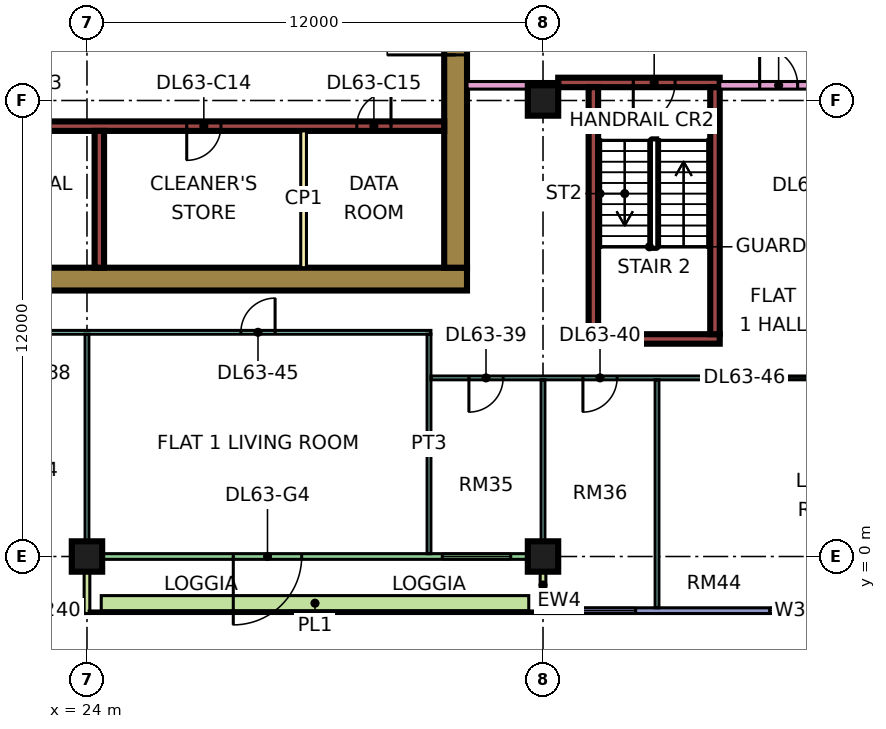
"""IFC4 building model, lengths in metres.
Left out: names, types, materials, properties, quantities, classifications, styles, units other than length and angle.
Written with IfcOpenShell. Run it as: python <this file> out.ifc"""

import sys

from ifc_helpers import new_model, si_unit, direction, frame, frame_2d, origin, origin_2d, place, context, subcontext, project, spatial, rectangle, extrude, element, fill, save


model = new_model("IFC4")
c1 = context("Model", 3, precision=1e-05, world=origin(), true_north=direction((0.0, 1.0)))
c2 = subcontext(c1, "Body", "Model", "MODEL_VIEW")
j1 = project(units=[si_unit("LENGTHUNIT", "METRE"), si_unit("PLANEANGLEUNIT", "RADIAN")], contexts=[c1])
p1 = place(None, origin())
s1 = spatial("IfcSite", under=j1, at=p1, CompositionType="ELEMENT")
p2 = place(p1, origin())
s2 = spatial("IfcBuilding", under=s1, at=p2, CompositionType="ELEMENT")
p3 = place(p2, frame((0.0, 0.0, 273.4)))
s3 = spatial("IfcBuildingStorey", under=s2, at=p3, CompositionType="ELEMENT", Elevation=273.4)
for number, where, z_axis, x_axis in (
    (1, (24.0, 0.0, 0.0), (0.0, 0.0, 1.0), (1.0, 0.0, 0.0)),
    (2, (36.0, 0.0, 0.0), (0.0, 0.0, 1.0), (1.0, 0.0, 0.0)),
    (3, (36.0, 12.0, 0.0), (0.0, 0.0, 1.0), (1.0, 0.0, 0.0)),
):
    element("IfcColumn", number, at=place(p3, frame(where, z_axis=z_axis, x_axis=x_axis)), inside=s3, PredefinedType="COLUMN", context=c2, shape_type="SweptSolid", body=[
        extrude(rectangle(XDim=0.8, YDim=0.8, at=origin_2d()), origin(), (0.0, 0.0, 1.0), 3.75),
    ])
p4 = place(p3, frame((9.0, 7.3, 0.0), z_axis=(0.0, 0.0, 1.0), x_axis=(1.0, 0.0, 0.0)))
e4 = element("IfcWall", 4, at=p4, inside=s3, PredefinedType="SHEAR", context=c2, shape_type="SweptSolid", body=[
    extrude(rectangle(XDim=25.0, YDim=0.6, at=frame_2d((12.5, 0.0))), origin(), (0.0, 0.0, 1.0), 3.75),
])
p5 = place(p3, frame((33.7, 7.6, 0.0), z_axis=(0.0, 0.0, 1.0), x_axis=(0.0, 1.0, 0.0)))
e5 = element("IfcWall", 5, at=p5, inside=s3, PredefinedType="SHEAR", context=c2, shape_type="SweptSolid", body=[
    extrude(rectangle(XDim=11.8, YDim=0.6, at=frame_2d((5.9, 0.0))), origin(), (0.0, 0.0, 1.0), 3.75),
])
p6 = place(p5, frame((5.6, 0.0, 0.0)))
e6 = element("IfcOpeningElement", 6, at=p6, cuts=e5, PredefinedType="OPENING", context=c2, shape_type="SweptSolid", body=[
    extrude(rectangle(XDim=1.8, YDim=2.4, at=frame_2d((0.9, 1.2))), frame((0.0, 0.31, 0.0), z_axis=(0.0, -1.0, 0.0), x_axis=(1.0, 0.0, 0.0)), (0.0, 0.0, 1.0), 0.62),
])
p7 = place(p3, frame((13.45, 11.325, 0.0), z_axis=(0.0, 0.0, 1.0), x_axis=(1.0, 0.0, 0.0)))
e7 = element("IfcWall", 7, at=p7, inside=s3, PredefinedType="SHEAR", context=c2, shape_type="SweptSolid", body=[
    extrude(rectangle(XDim=19.95, YDim=0.25, at=frame_2d((9.975, 0.0))), origin(), (0.0, 0.0, 1.0), 3.75),
])
p8 = place(p7, frame((2.8, 0.0, 0.0)))
e8 = element("IfcOpeningElement", 8, at=p8, cuts=e7, PredefinedType="OPENING", context=c2, shape_type="SweptSolid", body=[
    extrude(rectangle(XDim=0.9, YDim=2.1, at=frame_2d((0.45, 1.05))), frame((0.0, 0.135, 0.0), z_axis=(0.0, -1.0, 0.0), x_axis=(1.0, 0.0, 0.0)), (0.0, 0.0, 1.0), 0.27),
])
p9 = place(p7, frame((8.175, 0.0, 0.0)))
e9 = element("IfcOpeningElement", 9, at=p9, cuts=e7, PredefinedType="OPENING", context=c2, shape_type="SweptSolid", body=[
    extrude(rectangle(XDim=0.9, YDim=2.1, at=frame_2d((0.45, 1.05))), frame((0.0, 0.135, 0.0), z_axis=(0.0, -1.0, 0.0), x_axis=(1.0, 0.0, 0.0)), (0.0, 0.0, 1.0), 0.27),
])
p10 = place(p7, frame((13.175, 0.0, 0.0)))
e10 = element("IfcOpeningElement", 10, at=p10, cuts=e7, PredefinedType="OPENING", context=c2, shape_type="SweptSolid", body=[
    extrude(rectangle(XDim=0.9, YDim=2.1, at=frame_2d((0.45, 1.05))), frame((0.0, 0.135, 0.0), z_axis=(0.0, -1.0, 0.0), x_axis=(1.0, 0.0, 0.0)), (0.0, 0.0, 1.0), 0.27),
])
p11 = place(p7, frame((17.65, 0.0, 0.0)))
e11 = element("IfcOpeningElement", 11, at=p11, cuts=e7, PredefinedType="OPENING", context=c2, shape_type="SweptSolid", body=[
    extrude(rectangle(XDim=0.9, YDim=2.1, at=frame_2d((0.45, 1.05))), frame((0.0, 0.135, 0.0), z_axis=(0.0, -1.0, 0.0), x_axis=(1.0, 0.0, 0.0)), (0.0, 0.0, 1.0), 0.27),
])
p12 = place(p3, frame((24.325, 7.6, 0.0), z_axis=(0.0, 0.0, 1.0), x_axis=(0.0, 1.0, 0.0)))
e12 = element("IfcWall", 12, at=p12, inside=s3, PredefinedType="SHEAR", context=c2, shape_type="SweptSolid", body=[
    extrude(rectangle(XDim=3.6, YDim=0.25, at=frame_2d((1.8, 0.0))), origin(), (0.0, 0.0, 1.0), 3.75),
])
p13 = place(p3, frame((37.2, 5.725, 0.0), z_axis=(0.0, 0.0, 1.0), x_axis=(1.0, 0.0, 0.0)))
e13 = element("IfcWall", 13, at=p13, inside=s3, PredefinedType="SHEAR", context=c2, shape_type="SweptSolid", body=[
    extrude(rectangle(XDim=3.45, YDim=0.25, at=frame_2d((1.725, 0.0))), origin(), (0.0, 0.0, 1.0), 3.75),
])
p14 = place(p3, frame((36.4, 12.475, 0.0), z_axis=(0.0, 0.0, 1.0), x_axis=(1.0, 0.0, 0.0)))
e14 = element("IfcWall", 14, at=p14, inside=s3, PredefinedType="SHEAR", context=c2, shape_type="SweptSolid", body=[
    extrude(rectangle(XDim=4.25, YDim=0.25, at=frame_2d((2.125, 0.0))), origin(), (0.0, 0.0, 1.0), 3.75),
])
p15 = place(p14, frame((1.975, 0.0, 0.0)))
e15 = element("IfcOpeningElement", 15, at=p15, cuts=e14, PredefinedType="OPENING", context=c2, shape_type="SweptSolid", body=[
    extrude(rectangle(XDim=1.1, YDim=2.2, at=frame_2d((0.55, 1.1))), frame((0.0, 0.135, 0.0), z_axis=(0.0, -1.0, 0.0), x_axis=(1.0, 0.0, 0.0)), (0.0, 0.0, 1.0), 0.27),
])
for number, where, z_axis, x_axis in (
    (16, (37.325, 5.85, 0.0), (0.0, 0.0, 1.0), (0.0, 1.0, 0.0)),
    (17, (40.525, 5.85, 0.0), (0.0, 0.0, 1.0), (0.0, 1.0, 0.0)),
):
    element("IfcWall", number, at=place(p3, frame(where, z_axis=z_axis, x_axis=x_axis)), inside=s3, PredefinedType="SHEAR", context=c2, shape_type="SweptSolid", body=[
        extrude(rectangle(XDim=6.5, YDim=0.25, at=frame_2d((3.25, 0.0))), origin(), (0.0, 0.0, 1.0), 3.75),
    ])
p16 = place(p3, frame((12.5, -1.425, 0.0), z_axis=(0.0, 0.0, 1.0), x_axis=(1.0, 0.0, 0.0)))
e18 = element("IfcWall", 18, at=p16, inside=s3, PredefinedType="SOLIDWALL", context=c2, shape_type="SweptSolid", body=[
    extrude(rectangle(XDim=11.425, YDim=0.15, at=frame_2d((5.712, 0.0))), origin(), (0.0, 0.0, 1.0), 3.35),
])
p17 = place(p16, frame((0.35, 0.0, 0.45)))
e19 = element("IfcOpeningElement", 19, at=p17, cuts=e18, PredefinedType="OPENING", context=c2, shape_type="SweptSolid", body=[
    extrude(rectangle(XDim=1.8, YDim=2.4, at=frame_2d((0.9, 1.2))), frame((0.0, 0.085, 0.0), z_axis=(0.0, -1.0, 0.0), x_axis=(1.0, 0.0, 0.0)), (0.0, 0.0, 1.0), 0.17),
])
p18 = place(p16, frame((3.1, 0.0, 0.45)))
e20 = element("IfcOpeningElement", 20, at=p18, cuts=e18, PredefinedType="OPENING", context=c2, shape_type="SweptSolid", body=[
    extrude(rectangle(XDim=1.8, YDim=2.4, at=frame_2d((0.9, 1.2))), frame((0.0, 0.085, 0.0), z_axis=(0.0, -1.0, 0.0), x_axis=(1.0, 0.0, 0.0)), (0.0, 0.0, 1.0), 0.17),
])
p19 = place(p16, frame((6.1, 0.0, 0.45)))
e21 = element("IfcOpeningElement", 21, at=p19, cuts=e18, PredefinedType="OPENING", context=c2, shape_type="SweptSolid", body=[
    extrude(rectangle(XDim=1.8, YDim=2.4, at=frame_2d((0.9, 1.2))), frame((0.0, 0.085, 0.0), z_axis=(0.0, -1.0, 0.0), x_axis=(1.0, 0.0, 0.0)), (0.0, 0.0, 1.0), 0.17),
])
p20 = place(p16, frame((9.062, 0.0, 0.45)))
e22 = element("IfcOpeningElement", 22, at=p20, cuts=e18, PredefinedType="OPENING", context=c2, shape_type="SweptSolid", body=[
    extrude(rectangle(XDim=1.8, YDim=2.4, at=frame_2d((0.9, 1.2))), frame((0.0, 0.085, 0.0), z_axis=(0.0, -1.0, 0.0), x_axis=(1.0, 0.0, 0.0)), (0.0, 0.0, 1.0), 0.17),
])
p21 = place(p3, frame((24.075, 0.0, 0.0), z_axis=(0.0, 0.0, 1.0), x_axis=(1.0, 0.0, 0.0)))
e23 = element("IfcWall", 23, at=p21, inside=s3, PredefinedType="SOLIDWALL", context=c2, shape_type="SweptSolid", body=[
    extrude(rectangle(XDim=11.85, YDim=0.15, at=frame_2d((5.925, 0.0))), origin(), (0.0, 0.0, 1.0), 3.35),
])
p22 = place(p21, frame((3.775, 0.0, 0.0)))
e24 = element("IfcOpeningElement", 24, at=p22, cuts=e23, PredefinedType="OPENING", context=c2, shape_type="SweptSolid", body=[
    extrude(rectangle(XDim=1.8, YDim=2.4, at=frame_2d((0.9, 1.2))), frame((0.0, 0.085, 0.0), z_axis=(0.0, -1.0, 0.0), x_axis=(1.0, 0.0, 0.0)), (0.0, 0.0, 1.0), 0.17),
])
p23 = place(p21, frame((9.275, 0.0, 0.45)))
e25 = element("IfcOpeningElement", 25, at=p23, cuts=e23, PredefinedType="OPENING", context=c2, shape_type="SweptSolid", body=[
    extrude(rectangle(XDim=1.8, YDim=2.4, at=frame_2d((0.9, 1.2))), frame((0.0, 0.085, 0.0), z_axis=(0.0, -1.0, 0.0), x_axis=(1.0, 0.0, 0.0)), (0.0, 0.0, 1.0), 0.17),
])
for number, where, z_axis, x_axis in (
    (26, (24.0, -1.5, 0.0), (0.0, 0.0, 1.0), (0.0, 1.0, 0.0)),
    (27, (36.0, -1.5, 0.0), (0.0, 0.0, 1.0), (0.0, 1.0, 0.0)),
):
    element("IfcWall", number, at=place(p3, frame(where, z_axis=z_axis, x_axis=x_axis)), inside=s3, PredefinedType="SOLIDWALL", context=c2, shape_type="SweptSolid", body=[
        extrude(rectangle(XDim=1.5, YDim=0.15, at=frame_2d((0.75, 0.0))), origin(), (0.0, 0.0, 1.0), 3.35),
    ])
p24 = place(p3, frame((36.075, -1.425, 0.0), z_axis=(0.0, 0.0, 1.0), x_axis=(1.0, 0.0, 0.0)))
e28 = element("IfcWall", 28, at=p24, inside=s3, PredefinedType="SOLIDWALL", context=c2, shape_type="SweptSolid", body=[
    extrude(rectangle(XDim=11.85, YDim=0.15, at=frame_2d((5.925, 0.0))), origin(), (0.0, 0.0, 1.0), 3.35),
])
p25 = place(p24, frame((0.562, 0.0, 0.45)))
e29 = element("IfcOpeningElement", 29, at=p25, cuts=e28, PredefinedType="OPENING", context=c2, shape_type="SweptSolid", body=[
    extrude(rectangle(XDim=1.8, YDim=2.4, at=frame_2d((0.9, 1.2))), frame((0.0, 0.085, 0.0), z_axis=(0.0, -1.0, 0.0), x_axis=(1.0, 0.0, 0.0)), (0.0, 0.0, 1.0), 0.17),
])
p26 = place(p24, frame((5.887, 0.0, 0.45)))
e30 = element("IfcOpeningElement", 30, at=p26, cuts=e28, PredefinedType="OPENING", context=c2, shape_type="SweptSolid", body=[
    extrude(rectangle(XDim=3.0, YDim=2.4, at=frame_2d((1.5, 1.2))), frame((0.0, 0.085, 0.0), z_axis=(0.0, -1.0, 0.0), x_axis=(1.0, 0.0, 0.0)), (0.0, 0.0, 1.0), 0.17),
])
p27 = place(p3, frame((24.375, -1.229, 0.0), z_axis=(0.0, 0.0, 1.0), x_axis=(1.0, 0.0, 0.0)))
e31 = element("IfcWall", 31, at=p27, inside=s3, PredefinedType="SOLIDWALL", context=c2, shape_type="SweptSolid", body=[
    extrude(rectangle(XDim=11.25, YDim=0.4, at=frame_2d((5.625, 0.0))), origin(), (0.0, 0.0, 1.0), 0.7),
])
p28 = place(p3, frame((29.7, 7.6, 0.0), z_axis=(0.0, 0.0, 1.0), x_axis=(0.0, 1.0, 0.0)))
e32 = element("IfcWall", 32, at=p28, inside=s3, PredefinedType="PARTITIONING", context=c2, shape_type="SweptSolid", body=[
    extrude(rectangle(XDim=3.6, YDim=0.15, at=frame_2d((1.8, 0.0))), origin(), (0.0, 0.0, 1.0), 3.35),
])
p29 = place(p3, frame((11.95, 5.9, 0.0), z_axis=(0.0, 0.0, 1.0), x_axis=(1.0, 0.0, 0.0)))
e33 = element("IfcWall", 33, at=p29, inside=s3, PredefinedType="PARTITIONING", context=c2, shape_type="SweptSolid", body=[
    extrude(rectangle(XDim=21.1, YDim=0.1, at=frame_2d((10.55, 0.0))), origin(), (0.0, 0.0, 1.0), 3.35),
])
p30 = place(p29, frame((1.1, 0.0, 0.0)))
e34 = element("IfcOpeningElement", 34, at=p30, cuts=e33, PredefinedType="OPENING", context=c2, shape_type="SweptSolid", body=[
    extrude(rectangle(XDim=0.9, YDim=2.1, at=frame_2d((0.45, 1.05))), frame((0.0, 0.06, 0.0), z_axis=(0.0, -1.0, 0.0), x_axis=(1.0, 0.0, 0.0)), (0.0, 0.0, 1.0), 0.12),
])
p31 = place(p29, frame((4.1, 0.0, 0.0)))
e35 = element("IfcOpeningElement", 35, at=p31, cuts=e33, PredefinedType="OPENING", context=c2, shape_type="SweptSolid", body=[
    extrude(rectangle(XDim=0.9, YDim=2.1, at=frame_2d((0.45, 1.05))), frame((0.0, 0.06, 0.0), z_axis=(0.0, -1.0, 0.0), x_axis=(1.0, 0.0, 0.0)), (0.0, 0.0, 1.0), 0.12),
])
p32 = place(p29, frame((7.1, 0.0, 0.0)))
e36 = element("IfcOpeningElement", 36, at=p32, cuts=e33, PredefinedType="OPENING", context=c2, shape_type="SweptSolid", body=[
    extrude(rectangle(XDim=0.9, YDim=2.1, at=frame_2d((0.45, 1.05))), frame((0.0, 0.06, 0.0), z_axis=(0.0, -1.0, 0.0), x_axis=(1.0, 0.0, 0.0)), (0.0, 0.0, 1.0), 0.12),
])
p33 = place(p29, frame((10.1, 0.0, 0.0)))
e37 = element("IfcOpeningElement", 37, at=p33, cuts=e33, PredefinedType="OPENING", context=c2, shape_type="SweptSolid", body=[
    extrude(rectangle(XDim=0.9, YDim=2.1, at=frame_2d((0.45, 1.05))), frame((0.0, 0.06, 0.0), z_axis=(0.0, -1.0, 0.0), x_axis=(1.0, 0.0, 0.0)), (0.0, 0.0, 1.0), 0.12),
])
p34 = place(p29, frame((16.1, 0.0, 0.0)))
e38 = element("IfcOpeningElement", 38, at=p34, cuts=e33, PredefinedType="OPENING", context=c2, shape_type="SweptSolid", body=[
    extrude(rectangle(XDim=0.9, YDim=2.1, at=frame_2d((0.45, 1.05))), frame((0.0, 0.06, 0.0), z_axis=(0.0, -1.0, 0.0), x_axis=(1.0, 0.0, 0.0)), (0.0, 0.0, 1.0), 0.12),
])
p35 = place(p3, frame((24.0, 0.0, 0.0), z_axis=(0.0, 0.0, 1.0), x_axis=(0.0, 1.0, 0.0)))
e39 = element("IfcWall", 39, at=p35, inside=s3, PredefinedType="PARTITIONING", context=c2, shape_type="SweptSolid", body=[
    extrude(rectangle(XDim=5.85, YDim=0.1, at=frame_2d((2.925, 0.0))), origin(), (0.0, 0.0, 1.0), 3.35),
])
p36 = place(p3, frame((33.0, 0.074, 0.0), z_axis=(0.0, 0.0, 1.0), x_axis=(0.0, 1.0, 0.0)))
e40 = element("IfcWall", 40, at=p36, inside=s3, PredefinedType="PARTITIONING", context=c2, shape_type="SweptSolid", body=[
    extrude(rectangle(XDim=5.776, YDim=0.1, at=frame_2d((2.888, 0.0))), origin(), (0.0, 0.0, 1.0), 3.35),
])
p37 = place(p3, frame((33.05, 4.7, 0.0), z_axis=(0.0, 0.0, 1.0), x_axis=(1.0, 0.0, 0.0)))
e41 = element("IfcWall", 41, at=p37, inside=s3, PredefinedType="PARTITIONING", context=c2, shape_type="SweptSolid", body=[
    extrude(rectangle(XDim=14.85, YDim=0.1, at=frame_2d((7.425, 0.0))), origin(), (0.0, 0.0, 1.0), 3.35),
])
p38 = place(p37, frame((1.0, 0.0, 0.0)))
e42 = element("IfcOpeningElement", 42, at=p38, cuts=e41, PredefinedType="OPENING", context=c2, shape_type="SweptSolid", body=[
    extrude(rectangle(XDim=0.9, YDim=2.1, at=frame_2d((0.45, 1.05))), frame((0.0, 0.06, 0.0), z_axis=(0.0, -1.0, 0.0), x_axis=(1.0, 0.0, 0.0)), (0.0, 0.0, 1.0), 0.12),
])
p39 = place(p37, frame((4.0, 0.0, 0.0)))
e43 = element("IfcOpeningElement", 43, at=p39, cuts=e41, PredefinedType="OPENING", context=c2, shape_type="SweptSolid", body=[
    extrude(rectangle(XDim=0.9, YDim=2.1, at=frame_2d((0.45, 1.05))), frame((0.0, 0.06, 0.0), z_axis=(0.0, -1.0, 0.0), x_axis=(1.0, 0.0, 0.0)), (0.0, 0.0, 1.0), 0.12),
])
p40 = place(p37, frame((10.0, 0.0, 0.0)))
e44 = element("IfcOpeningElement", 44, at=p40, cuts=e41, PredefinedType="OPENING", context=c2, shape_type="SweptSolid", body=[
    extrude(rectangle(XDim=0.9, YDim=2.1, at=frame_2d((0.45, 1.05))), frame((0.0, 0.06, 0.0), z_axis=(0.0, -1.0, 0.0), x_axis=(1.0, 0.0, 0.0)), (0.0, 0.0, 1.0), 0.12),
])
p41 = place(p3, frame((34.0, 12.4, 0.0), z_axis=(0.0, 0.0, 1.0), x_axis=(1.0, 0.0, 0.0)))
e45 = element("IfcWall", 45, at=p41, inside=s3, PredefinedType="PARTITIONING", context=c2, shape_type="SweptSolid", body=[
    extrude(rectangle(XDim=2.401, YDim=0.2, at=frame_2d((1.2, 0.0))), origin(), (0.0, 0.0, 1.0), 3.35),
])
p42 = place(p3, frame((36.0, 0.0, 0.0), z_axis=(0.0, 0.0, 1.0), x_axis=(0.0, 1.0, 0.0)))
e46 = element("IfcWall", 46, at=p42, inside=s3, PredefinedType="PARTITIONING", context=c2, shape_type="SweptSolid", body=[
    extrude(rectangle(XDim=4.65, YDim=0.1, at=frame_2d((2.325, 0.0))), origin(), (0.0, 0.0, 1.0), 3.35),
])
p43 = place(p3, frame((39.0, -1.35, 0.0), z_axis=(0.0, 0.0, 1.0), x_axis=(0.0, 1.0, 0.0)))
e47 = element("IfcWall", 47, at=p43, inside=s3, PredefinedType="PARTITIONING", context=c2, shape_type="SweptSolid", body=[
    extrude(rectangle(XDim=6.0, YDim=0.1, at=frame_2d((3.0, 0.0))), origin(), (0.0, 0.0, 1.0), 3.35),
])
p44 = place(p3, frame((40.65, 12.4, 0.0), z_axis=(0.0, 0.0, 1.0), x_axis=(1.0, 0.0, 0.0)))
e48 = element("IfcWall", 48, at=p44, inside=s3, PredefinedType="PARTITIONING", context=c2, shape_type="SweptSolid", body=[
    extrude(rectangle(XDim=22.35, YDim=0.2, at=frame_2d((11.175, 0.0))), origin(), (0.0, 0.0, 1.0), 3.35),
])
p45 = place(p44, frame((14.25, 0.0, 0.0)))
e49 = element("IfcOpeningElement", 49, at=p45, cuts=e48, PredefinedType="OPENING", context=c2, shape_type="SweptSolid", body=[
    extrude(rectangle(XDim=1.0, YDim=2.1, at=frame_2d((0.5, 1.05))), frame((0.0, 0.11, 0.0), z_axis=(0.0, -1.0, 0.0), x_axis=(1.0, 0.0, 0.0)), (0.0, 0.0, 1.0), 0.22),
])
p46 = place(p44, frame((1.05, 0.0, 0.0)))
e50 = element("IfcOpeningElement", 50, at=p46, cuts=e48, PredefinedType="OPENING", context=c2, shape_type="SweptSolid", body=[
    extrude(rectangle(XDim=1.0, YDim=2.1, at=frame_2d((0.5, 1.05))), frame((0.0, 0.11, 0.0), z_axis=(0.0, -1.0, 0.0), x_axis=(1.0, 0.0, 0.0)), (0.0, 0.0, 1.0), 0.22),
])
p47 = place(p20, origin())
e51 = element("IfcWindow", 51, at=p47, inside=s3, PartitioningType="SINGLE_PANEL", PredefinedType="WINDOW", context=c2, shape_type="SweptSolid", body=[
    extrude(rectangle(XDim=1.8, YDim=2.4, at=frame_2d((0.9, 1.2))), frame((0.0, 0.03, 0.0), z_axis=(0.0, -1.0, 0.0), x_axis=(1.0, 0.0, 0.0)), (0.0, 0.0, 1.0), 0.06),
])
fill(e22, e51)
p48 = place(p22, frame((1.8, 0.0, 0.0), z_axis=(0.0, 0.0, 1.0), x_axis=(-1.0, 0.0, 0.0)))
e52 = element("IfcDoor", 52, at=p48, inside=s3, OperationType="DOUBLE_DOOR_SINGLE_SWING", PredefinedType="DOOR", context=c2, shape_type="SweptSolid", body=[
    extrude(rectangle(XDim=1.8, YDim=2.4, at=frame_2d((0.9, 1.2))), frame((0.0, 0.025, 0.0), z_axis=(0.0, -1.0, 0.0), x_axis=(1.0, 0.0, 0.0)), (0.0, 0.0, 1.0), 0.05),
])
fill(e24, e52)
p49 = place(p23, origin())
e53 = element("IfcWindow", 53, at=p49, inside=s3, PartitioningType="SINGLE_PANEL", PredefinedType="WINDOW", context=c2, shape_type="SweptSolid", body=[
    extrude(rectangle(XDim=1.8, YDim=2.4, at=frame_2d((0.9, 1.2))), frame((0.0, 0.03, 0.0), z_axis=(0.0, -1.0, 0.0), x_axis=(1.0, 0.0, 0.0)), (0.0, 0.0, 1.0), 0.06),
])
fill(e25, e53)
p50 = place(p25, origin())
e54 = element("IfcWindow", 54, at=p50, inside=s3, PartitioningType="SINGLE_PANEL", PredefinedType="WINDOW", context=c2, shape_type="SweptSolid", body=[
    extrude(rectangle(XDim=1.8, YDim=2.4, at=frame_2d((0.9, 1.2))), frame((0.0, 0.03, 0.0), z_axis=(0.0, -1.0, 0.0), x_axis=(1.0, 0.0, 0.0)), (0.0, 0.0, 1.0), 0.06),
])
fill(e29, e54)
p51 = place(p26, origin())
e55 = element("IfcWindow", 55, at=p51, inside=s3, PartitioningType="SINGLE_PANEL", PredefinedType="WINDOW", context=c2, shape_type="SweptSolid", body=[
    extrude(rectangle(XDim=3.0, YDim=2.4, at=frame_2d((1.5, 1.2))), frame((0.0, 0.03, 0.0), z_axis=(0.0, -1.0, 0.0), x_axis=(1.0, 0.0, 0.0)), (0.0, 0.0, 1.0), 0.06),
])
fill(e30, e55)
p52 = place(p6, origin())
e56 = element("IfcDoor", 56, at=p52, inside=s3, OperationType="DOUBLE_DOOR_SINGLE_SWING", PredefinedType="DOOR", context=c2, shape_type="SweptSolid", body=[
    extrude(rectangle(XDim=1.8, YDim=2.4, at=frame_2d((0.9, 1.2))), frame((0.0, 0.025, 0.0), z_axis=(0.0, -1.0, 0.0), x_axis=(1.0, 0.0, 0.0)), (0.0, 0.0, 1.0), 0.05),
])
fill(e6, e56)
p53 = place(p15, frame((1.1, 0.0, 0.0), z_axis=(0.0, 0.0, 1.0), x_axis=(-1.0, 0.0, 0.0)))
e57 = element("IfcDoor", 57, at=p53, inside=s3, OperationType="SINGLE_SWING_LEFT", PredefinedType="DOOR", context=c2, shape_type="SweptSolid", body=[
    extrude(rectangle(XDim=1.1, YDim=2.2, at=frame_2d((0.55, 1.1))), frame((0.0, 0.025, 0.0), z_axis=(0.0, -1.0, 0.0), x_axis=(1.0, 0.0, 0.0)), (0.0, 0.0, 1.0), 0.05),
])
fill(e15, e57)
p54 = place(p10, frame((0.9, 0.0, 0.0), z_axis=(0.0, 0.0, 1.0), x_axis=(-1.0, 0.0, 0.0)))
e58 = element("IfcDoor", 58, at=p54, inside=s3, OperationType="SINGLE_SWING_LEFT", PredefinedType="DOOR", context=c2, shape_type="SweptSolid", body=[
    extrude(rectangle(XDim=0.9, YDim=2.1, at=frame_2d((0.45, 1.05))), frame((0.0, 0.025, 0.0), z_axis=(0.0, -1.0, 0.0), x_axis=(1.0, 0.0, 0.0)), (0.0, 0.0, 1.0), 0.05),
])
fill(e10, e58)
p55 = place(p11, frame((0.9, 0.0, 0.0), z_axis=(0.0, 0.0, 1.0), x_axis=(-1.0, 0.0, 0.0)))
e59 = element("IfcDoor", 59, at=p55, inside=s3, OperationType="SINGLE_SWING_RIGHT", PredefinedType="DOOR", context=c2, shape_type="SweptSolid", body=[
    extrude(rectangle(XDim=0.9, YDim=2.1, at=frame_2d((0.45, 1.05))), frame((0.0, 0.025, 0.0), z_axis=(0.0, -1.0, 0.0), x_axis=(1.0, 0.0, 0.0)), (0.0, 0.0, 1.0), 0.05),
])
fill(e11, e59)
p56 = place(p38, frame((0.9, 0.0, 0.0), z_axis=(0.0, 0.0, 1.0), x_axis=(-1.0, 0.0, 0.0)))
e60 = element("IfcDoor", 60, at=p56, inside=s3, OperationType="SINGLE_SWING_LEFT", PredefinedType="DOOR", context=c2, shape_type="SweptSolid", body=[
    extrude(rectangle(XDim=0.9, YDim=2.1, at=frame_2d((0.45, 1.05))), frame((0.0, 0.025, 0.0), z_axis=(0.0, -1.0, 0.0), x_axis=(1.0, 0.0, 0.0)), (0.0, 0.0, 1.0), 0.05),
])
fill(e42, e60)
p57 = place(p39, frame((0.9, 0.0, 0.0), z_axis=(0.0, 0.0, 1.0), x_axis=(-1.0, 0.0, 0.0)))
e61 = element("IfcDoor", 61, at=p57, inside=s3, OperationType="SINGLE_SWING_LEFT", PredefinedType="DOOR", context=c2, shape_type="SweptSolid", body=[
    extrude(rectangle(XDim=0.9, YDim=2.1, at=frame_2d((0.45, 1.05))), frame((0.0, 0.025, 0.0), z_axis=(0.0, -1.0, 0.0), x_axis=(1.0, 0.0, 0.0)), (0.0, 0.0, 1.0), 0.05),
])
fill(e43, e61)
p58 = place(p46, origin())
e62 = element("IfcDoor", 62, at=p58, inside=s3, OperationType="SINGLE_SWING_LEFT", PredefinedType="DOOR", context=c2, shape_type="SweptSolid", body=[
    extrude(rectangle(XDim=1.0, YDim=2.1, at=frame_2d((0.5, 1.05))), frame((0.0, 0.025, 0.0), z_axis=(0.0, -1.0, 0.0), x_axis=(1.0, 0.0, 0.0)), (0.0, 0.0, 1.0), 0.05),
])
fill(e50, e62)
p59 = place(p34, frame((0.9, 0.0, 0.0), z_axis=(0.0, 0.0, 1.0), x_axis=(-1.0, 0.0, 0.0)))
e63 = element("IfcDoor", 63, at=p59, inside=s3, OperationType="SINGLE_SWING_RIGHT", PredefinedType="DOOR", context=c2, shape_type="SweptSolid", body=[
    extrude(rectangle(XDim=0.9, YDim=2.1, at=frame_2d((0.45, 1.05))), frame((0.0, 0.025, 0.0), z_axis=(0.0, -1.0, 0.0), x_axis=(1.0, 0.0, 0.0)), (0.0, 0.0, 1.0), 0.05),
])
fill(e38, e63)
save(model, sys.argv[1])
